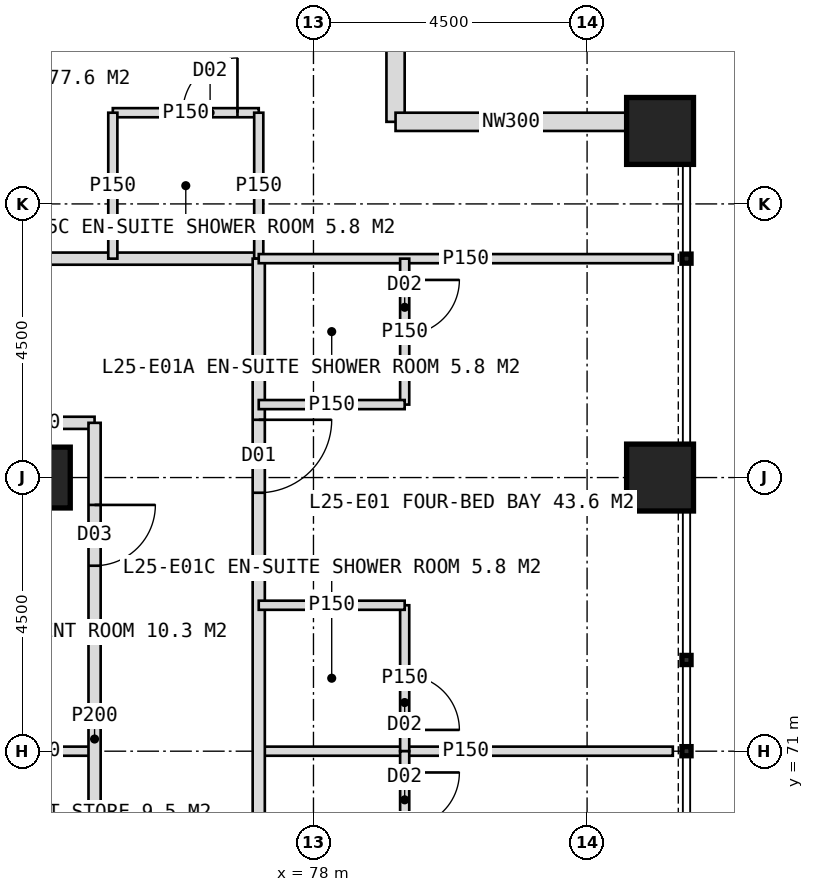
"""IFC4 building model, lengths in metres.
Left out: names, types, materials, properties, quantities, classifications, styles, units other than length and angle.
Written with IfcOpenShell. Run it as: python <this file> out.ifc"""

import sys

from ifc_helpers import new_model, si_unit, direction, frame, frame_2d, origin, origin_2d, place, context, subcontext, project, spatial, rectangle, hollow_rectangle, extrude, element, fill, save


model = new_model("IFC4")
c1 = context("Model", 3, precision=1e-05, world=origin(), true_north=direction((0.0, 1.0)))
c2 = subcontext(c1, "Body", "Model", "MODEL_VIEW")
j1 = project(units=[si_unit("LENGTHUNIT", "METRE"), si_unit("PLANEANGLEUNIT", "RADIAN")], contexts=[c1])
p1 = place(None, origin())
s1 = spatial("IfcSite", under=j1, at=p1, CompositionType="ELEMENT")
p2 = place(p1, origin())
s2 = spatial("IfcBuilding", under=s1, at=p2, CompositionType="ELEMENT")
p3 = place(p2, frame((0.0, 0.0, 108.0)))
s3 = spatial("IfcBuildingStorey", under=s2, at=p3, CompositionType="ELEMENT", Elevation=108.0)
p4 = place(p3, frame((73.5, 75.5, 0.0), z_axis=(0.0, 0.0, 1.0), x_axis=(1.0, 0.0, 0.0)))
e1 = element("IfcColumn", 1, at=p4, inside=s3, PredefinedType="COLUMN", context=c2, shape_type="SweptSolid", body=[
    extrude(hollow_rectangle(XDim=1.0, YDim=1.0, WallThickness=0.1, at=origin_2d()), origin(), (0.0, 0.0, 1.0), 4.0),
])
for number, where, z_axis, x_axis in (
    (2, (83.7, 75.5, 0.0), (0.0, 0.0, 1.0), (1.0, 0.0, 0.0)),
    (3, (83.7, 81.2, 0.0), (0.0, 0.0, 1.0), (1.0, 0.0, 0.0)),
):
    element("IfcColumn", number, at=place(p3, frame(where, z_axis=z_axis, x_axis=x_axis)), inside=s3, PredefinedType="COLUMN", context=c2, shape_type="SweptSolid", body=[
        extrude(hollow_rectangle(XDim=1.1, YDim=1.1, WallThickness=0.1, at=origin_2d()), origin(), (0.0, 0.0, 1.0), 4.0),
    ])
for number, where, z_axis, x_axis in (
    (4, (79.35, 85.15, 0.0), (0.0, 0.0, 1.0), (0.0, -1.0, 0.0)),
    (5, (79.35, 81.35, 0.0), (0.0, 0.0, 1.0), (1.0, 0.0, 0.0)),
):
    element("IfcWall", number, at=place(p3, frame(where, z_axis=z_axis, x_axis=x_axis)), inside=s3, PredefinedType="ELEMENTEDWALL", context=c2, shape_type="SweptSolid", body=[
        extrude(rectangle(XDim=3.8, YDim=0.3, at=frame_2d((1.9, 0.0))), origin(), (0.0, 0.0, 1.0), 4.0),
    ])
p5 = place(p3, frame((42.9, 79.1, 0.0), z_axis=(0.0, 0.0, 1.0), x_axis=(1.0, 0.0, 0.0)))
e6 = element("IfcWall", 6, at=p5, inside=s3, PredefinedType="PARTITIONING", context=c2, shape_type="SweptSolid", body=[
    extrude(rectangle(XDim=34.2, YDim=0.2, at=frame_2d((17.1, 0.0))), origin(), (0.0, 0.0, 1.0), 3.75),
])
p6 = place(p5, frame((3.25, 0.0, 0.0)))
e7 = element("IfcOpeningElement", 7, at=p6, cuts=e6, PredefinedType="OPENING", context=c2, shape_type="SweptSolid", body=[
    extrude(rectangle(XDim=1.2, YDim=2.2, at=frame_2d((0.6, 1.1))), frame((0.0, 0.11, 0.0), z_axis=(0.0, -1.0, 0.0), x_axis=(1.0, 0.0, 0.0)), (0.0, 0.0, 1.0), 0.22),
])
p7 = place(p5, frame((9.25, 0.0, 0.0)))
e8 = element("IfcOpeningElement", 8, at=p7, cuts=e6, PredefinedType="OPENING", context=c2, shape_type="SweptSolid", body=[
    extrude(rectangle(XDim=1.2, YDim=2.2, at=frame_2d((0.6, 1.1))), frame((0.0, 0.11, 0.0), z_axis=(0.0, -1.0, 0.0), x_axis=(1.0, 0.0, 0.0)), (0.0, 0.0, 1.0), 0.22),
])
p8 = place(p5, frame((13.75, 0.0, 0.0)))
e9 = element("IfcOpeningElement", 9, at=p8, cuts=e6, PredefinedType="OPENING", context=c2, shape_type="SweptSolid", body=[
    extrude(rectangle(XDim=1.2, YDim=2.2, at=frame_2d((0.6, 1.1))), frame((0.0, 0.11, 0.0), z_axis=(0.0, -1.0, 0.0), x_axis=(1.0, 0.0, 0.0)), (0.0, 0.0, 1.0), 0.22),
])
p9 = place(p5, frame((19.6, 0.0, 0.0)))
e10 = element("IfcOpeningElement", 10, at=p9, cuts=e6, PredefinedType="OPENING", context=c2, shape_type="SweptSolid", body=[
    extrude(rectangle(XDim=1.0, YDim=2.1, at=frame_2d((0.5, 1.05))), frame((0.0, 0.11, 0.0), z_axis=(0.0, -1.0, 0.0), x_axis=(1.0, 0.0, 0.0)), (0.0, 0.0, 1.0), 0.22),
])
p10 = place(p5, frame((27.25, 0.0, 0.0)))
e11 = element("IfcOpeningElement", 11, at=p10, cuts=e6, PredefinedType="OPENING", context=c2, shape_type="SweptSolid", body=[
    extrude(rectangle(XDim=1.2, YDim=2.2, at=frame_2d((0.6, 1.1))), frame((0.0, 0.11, 0.0), z_axis=(0.0, -1.0, 0.0), x_axis=(1.0, 0.0, 0.0)), (0.0, 0.0, 1.0), 0.22),
])
p11 = place(p3, frame((74.7, 81.5, 0.0), z_axis=(0.0, 0.0, 1.0), x_axis=(1.0, 0.0, 0.0)))
e12 = element("IfcWall", 12, at=p11, inside=s3, PredefinedType="PARTITIONING", context=c2, shape_type="SweptSolid", body=[
    extrude(rectangle(XDim=2.4, YDim=0.15, at=frame_2d((1.2, 0.0))), origin(), (0.0, 0.0, 1.0), 3.75),
])
p12 = place(p11, frame((1.15, 0.0, 0.0)))
e13 = element("IfcOpeningElement", 13, at=p12, cuts=e12, PredefinedType="OPENING", context=c2, shape_type="SweptSolid", body=[
    extrude(rectangle(XDim=0.9, YDim=2.1, at=frame_2d((0.45, 1.05))), frame((0.0, 0.085, 0.0), z_axis=(0.0, -1.0, 0.0), x_axis=(1.0, 0.0, 0.0)), (0.0, 0.0, 1.0), 0.17),
])
for number, where, z_axis, x_axis in (
    (14, (74.7, 79.1, 0.0), (0.0, 0.0, 1.0), (0.0, 1.0, 0.0)),
    (15, (77.1, 79.1, 0.0), (0.0, 0.0, 1.0), (0.0, 1.0, 0.0)),
):
    element("IfcWall", number, at=place(p3, frame(where, z_axis=z_axis, x_axis=x_axis)), inside=s3, PredefinedType="PARTITIONING", context=c2, shape_type="SweptSolid", body=[
        extrude(rectangle(XDim=2.4, YDim=0.15, at=frame_2d((1.2, 0.0))), origin(), (0.0, 0.0, 1.0), 3.75),
    ])
p13 = place(p3, frame((72.5, 76.4, 0.0), z_axis=(0.0, 0.0, 1.0), x_axis=(1.0, 0.0, 0.0)))
e16 = element("IfcWall", 16, at=p13, inside=s3, PredefinedType="PARTITIONING", context=c2, shape_type="SweptSolid", body=[
    extrude(rectangle(XDim=1.9, YDim=0.2, at=frame_2d((0.95, 0.0))), origin(), (0.0, 0.0, 1.0), 3.75),
])
p14 = place(p3, frame((77.1, 71.0, 0.0), z_axis=(0.0, 0.0, 1.0), x_axis=(1.0, 0.0, 0.0)))
e17 = element("IfcWall", 17, at=p14, inside=s3, PredefinedType="PARTITIONING", context=c2, shape_type="SweptSolid", body=[
    extrude(rectangle(XDim=6.81, YDim=0.15, at=frame_2d((3.405, 0.0))), origin(), (0.0, 0.0, 1.0), 3.75),
])
p15 = place(p3, frame((77.1, 79.1, 0.0), z_axis=(0.0, 0.0, 1.0), x_axis=(0.0, -1.0, 0.0)))
e18 = element("IfcWall", 18, at=p15, inside=s3, PredefinedType="PARTITIONING", context=c2, shape_type="SweptSolid", body=[
    extrude(rectangle(XDim=34.2, YDim=0.2, at=frame_2d((17.1, 0.0))), origin(), (0.0, 0.0, 1.0), 3.75),
])
p16 = place(p15, frame((2.65, 0.0, 0.0)))
e19 = element("IfcOpeningElement", 19, at=p16, cuts=e18, PredefinedType="OPENING", context=c2, shape_type="SweptSolid", body=[
    extrude(rectangle(XDim=1.2, YDim=2.2, at=frame_2d((0.6, 1.1))), frame((0.0, 0.11, 0.0), z_axis=(0.0, -1.0, 0.0), x_axis=(1.0, 0.0, 0.0)), (0.0, 0.0, 1.0), 0.22),
])
p17 = place(p15, frame((10.75, 0.0, 0.0)))
e20 = element("IfcOpeningElement", 20, at=p17, cuts=e18, PredefinedType="OPENING", context=c2, shape_type="SweptSolid", body=[
    extrude(rectangle(XDim=1.2, YDim=2.2, at=frame_2d((0.6, 1.1))), frame((0.0, 0.11, 0.0), z_axis=(0.0, -1.0, 0.0), x_axis=(1.0, 0.0, 0.0)), (0.0, 0.0, 1.0), 0.22),
])
p18 = place(p15, frame((19.75, 0.0, 0.0)))
e21 = element("IfcOpeningElement", 21, at=p18, cuts=e18, PredefinedType="OPENING", context=c2, shape_type="SweptSolid", body=[
    extrude(rectangle(XDim=1.2, YDim=2.2, at=frame_2d((0.6, 1.1))), frame((0.0, 0.11, 0.0), z_axis=(0.0, -1.0, 0.0), x_axis=(1.0, 0.0, 0.0)), (0.0, 0.0, 1.0), 0.22),
])
p19 = place(p15, frame((25.75, 0.0, 0.0)))
e22 = element("IfcOpeningElement", 22, at=p19, cuts=e18, PredefinedType="OPENING", context=c2, shape_type="SweptSolid", body=[
    extrude(rectangle(XDim=1.2, YDim=2.2, at=frame_2d((0.6, 1.1))), frame((0.0, 0.11, 0.0), z_axis=(0.0, -1.0, 0.0), x_axis=(1.0, 0.0, 0.0)), (0.0, 0.0, 1.0), 0.22),
])
p20 = place(p15, frame((30.25, 0.0, 0.0)))
e23 = element("IfcOpeningElement", 23, at=p20, cuts=e18, PredefinedType="OPENING", context=c2, shape_type="SweptSolid", body=[
    extrude(rectangle(XDim=1.2, YDim=2.2, at=frame_2d((0.6, 1.1))), frame((0.0, 0.11, 0.0), z_axis=(0.0, -1.0, 0.0), x_axis=(1.0, 0.0, 0.0)), (0.0, 0.0, 1.0), 0.22),
])
p21 = place(p3, frame((77.1, 79.1, 0.0), z_axis=(0.0, 0.0, 1.0), x_axis=(1.0, 0.0, 0.0)))
e24 = element("IfcWall", 24, at=p21, inside=s3, PredefinedType="PARTITIONING", context=c2, shape_type="SweptSolid", body=[
    extrude(rectangle(XDim=6.81, YDim=0.15, at=frame_2d((3.405, 0.0))), origin(), (0.0, 0.0, 1.0), 3.75),
])
p22 = place(p3, frame((79.5, 79.1, 0.0), z_axis=(0.0, 0.0, 1.0), x_axis=(0.0, -1.0, 0.0)))
e25 = element("IfcWall", 25, at=p22, inside=s3, PredefinedType="PARTITIONING", context=c2, shape_type="SweptSolid", body=[
    extrude(rectangle(XDim=2.4, YDim=0.15, at=frame_2d((1.2, 0.0))), origin(), (0.0, 0.0, 1.0), 3.75),
])
p23 = place(p22, frame((0.35, 0.0, 0.0)))
e26 = element("IfcOpeningElement", 26, at=p23, cuts=e25, PredefinedType="OPENING", context=c2, shape_type="SweptSolid", body=[
    extrude(rectangle(XDim=0.9, YDim=2.1, at=frame_2d((0.45, 1.05))), frame((0.0, 0.085, 0.0), z_axis=(0.0, -1.0, 0.0), x_axis=(1.0, 0.0, 0.0)), (0.0, 0.0, 1.0), 0.17),
])
p24 = place(p3, frame((77.1, 76.7, 0.0), z_axis=(0.0, 0.0, 1.0), x_axis=(1.0, 0.0, 0.0)))
e27 = element("IfcWall", 27, at=p24, inside=s3, PredefinedType="PARTITIONING", context=c2, shape_type="SweptSolid", body=[
    extrude(rectangle(XDim=2.4, YDim=0.15, at=frame_2d((1.2, 0.0))), origin(), (0.0, 0.0, 1.0), 3.75),
])
p25 = place(p3, frame((79.5, 73.4, 0.0), z_axis=(0.0, 0.0, 1.0), x_axis=(0.0, -1.0, 0.0)))
e28 = element("IfcWall", 28, at=p25, inside=s3, PredefinedType="PARTITIONING", context=c2, shape_type="SweptSolid", body=[
    extrude(rectangle(XDim=2.4, YDim=0.15, at=frame_2d((1.2, 0.0))), origin(), (0.0, 0.0, 1.0), 3.75),
])
p26 = place(p25, frame((1.15, 0.0, 0.0)))
e29 = element("IfcOpeningElement", 29, at=p26, cuts=e28, PredefinedType="OPENING", context=c2, shape_type="SweptSolid", body=[
    extrude(rectangle(XDim=0.9, YDim=2.1, at=frame_2d((0.45, 1.05))), frame((0.0, 0.085, 0.0), z_axis=(0.0, -1.0, 0.0), x_axis=(1.0, 0.0, 0.0)), (0.0, 0.0, 1.0), 0.17),
])
p27 = place(p3, frame((77.1, 73.4, 0.0), z_axis=(0.0, 0.0, 1.0), x_axis=(1.0, 0.0, 0.0)))
e30 = element("IfcWall", 30, at=p27, inside=s3, PredefinedType="PARTITIONING", context=c2, shape_type="SweptSolid", body=[
    extrude(rectangle(XDim=2.4, YDim=0.15, at=frame_2d((1.2, 0.0))), origin(), (0.0, 0.0, 1.0), 3.75),
])
p28 = place(p3, frame((79.5, 71.0, 0.0), z_axis=(0.0, 0.0, 1.0), x_axis=(0.0, -1.0, 0.0)))
e31 = element("IfcWall", 31, at=p28, inside=s3, PredefinedType="PARTITIONING", context=c2, shape_type="SweptSolid", body=[
    extrude(rectangle(XDim=2.4, YDim=0.15, at=frame_2d((1.2, 0.0))), origin(), (0.0, 0.0, 1.0), 3.75),
])
p29 = place(p28, frame((0.35, 0.0, 0.0)))
e32 = element("IfcOpeningElement", 32, at=p29, cuts=e31, PredefinedType="OPENING", context=c2, shape_type="SweptSolid", body=[
    extrude(rectangle(XDim=0.9, YDim=2.1, at=frame_2d((0.45, 1.05))), frame((0.0, 0.085, 0.0), z_axis=(0.0, -1.0, 0.0), x_axis=(1.0, 0.0, 0.0)), (0.0, 0.0, 1.0), 0.17),
])
p30 = place(p3, frame((72.5, 71.0, 0.0), z_axis=(0.0, 0.0, 1.0), x_axis=(1.0, 0.0, 0.0)))
e33 = element("IfcWall", 33, at=p30, inside=s3, PredefinedType="PARTITIONING", context=c2, shape_type="SweptSolid", body=[
    extrude(rectangle(XDim=1.9, YDim=0.15, at=frame_2d((0.95, 0.0))), origin(), (0.0, 0.0, 1.0), 3.75),
])
p31 = place(p3, frame((74.4, 76.4, 0.0), z_axis=(0.0, 0.0, 1.0), x_axis=(0.0, -1.0, 0.0)))
e34 = element("IfcWall", 34, at=p31, inside=s3, PredefinedType="PARTITIONING", context=c2, shape_type="SweptSolid", body=[
    extrude(rectangle(XDim=10.4, YDim=0.2, at=frame_2d((5.2, 0.0))), origin(), (0.0, 0.0, 1.0), 3.75),
])
p32 = place(p31, frame((1.35, 0.0, 0.0)))
e35 = element("IfcOpeningElement", 35, at=p32, cuts=e34, PredefinedType="OPENING", context=c2, shape_type="SweptSolid", body=[
    extrude(rectangle(XDim=1.0, YDim=2.1, at=frame_2d((0.5, 1.05))), frame((0.0, 0.11, 0.0), z_axis=(0.0, -1.0, 0.0), x_axis=(1.0, 0.0, 0.0)), (0.0, 0.0, 1.0), 0.22),
])
p33 = place(p31, frame((7.4, 0.0, 0.0)))
e36 = element("IfcOpeningElement", 36, at=p33, cuts=e34, PredefinedType="OPENING", context=c2, shape_type="SweptSolid", body=[
    extrude(rectangle(XDim=1.0, YDim=2.1, at=frame_2d((0.5, 1.05))), frame((0.0, 0.11, 0.0), z_axis=(0.0, -1.0, 0.0), x_axis=(1.0, 0.0, 0.0)), (0.0, 0.0, 1.0), 0.22),
])
p34 = place(p12, origin())
e37 = element("IfcDoor", 37, at=p34, inside=s3, OperationType="SINGLE_SWING_RIGHT", PredefinedType="DOOR", context=c2, shape_type="SweptSolid", body=[
    extrude(rectangle(XDim=0.9, YDim=2.1, at=frame_2d((0.45, 1.05))), frame((0.0, 0.025, 0.0), z_axis=(0.0, -1.0, 0.0), x_axis=(1.0, 0.0, 0.0)), (0.0, 0.0, 1.0), 0.05),
])
fill(e13, e37)
p35 = place(p32, origin())
e38 = element("IfcDoor", 38, at=p35, inside=s3, OperationType="SINGLE_SWING_LEFT", PredefinedType="DOOR", context=c2, shape_type="SweptSolid", body=[
    extrude(rectangle(XDim=1.0, YDim=2.1, at=frame_2d((0.5, 1.05))), frame((0.0, 0.025, 0.0), z_axis=(0.0, -1.0, 0.0), x_axis=(1.0, 0.0, 0.0)), (0.0, 0.0, 1.0), 0.05),
])
fill(e35, e38)
p36 = place(p16, origin())
e39 = element("IfcDoor", 39, at=p36, inside=s3, OperationType="SINGLE_SWING_LEFT", PredefinedType="DOOR", context=c2, shape_type="SweptSolid", body=[
    extrude(rectangle(XDim=1.2, YDim=2.2, at=frame_2d((0.6, 1.1))), frame((0.0, 0.025, 0.0), z_axis=(0.0, -1.0, 0.0), x_axis=(1.0, 0.0, 0.0)), (0.0, 0.0, 1.0), 0.05),
])
fill(e19, e39)
p37 = place(p23, origin())
e40 = element("IfcDoor", 40, at=p37, inside=s3, OperationType="SINGLE_SWING_LEFT", PredefinedType="DOOR", context=c2, shape_type="SweptSolid", body=[
    extrude(rectangle(XDim=0.9, YDim=2.1, at=frame_2d((0.45, 1.05))), frame((0.0, 0.025, 0.0), z_axis=(0.0, -1.0, 0.0), x_axis=(1.0, 0.0, 0.0)), (0.0, 0.0, 1.0), 0.05),
])
fill(e26, e40)
p38 = place(p26, origin())
e41 = element("IfcDoor", 41, at=p38, inside=s3, OperationType="SINGLE_SWING_RIGHT", PredefinedType="DOOR", context=c2, shape_type="SweptSolid", body=[
    extrude(rectangle(XDim=0.9, YDim=2.1, at=frame_2d((0.45, 1.05))), frame((0.0, 0.025, 0.0), z_axis=(0.0, -1.0, 0.0), x_axis=(1.0, 0.0, 0.0)), (0.0, 0.0, 1.0), 0.05),
])
fill(e29, e41)
p39 = place(p29, origin())
e42 = element("IfcDoor", 42, at=p39, inside=s3, OperationType="SINGLE_SWING_LEFT", PredefinedType="DOOR", context=c2, shape_type="SweptSolid", body=[
    extrude(rectangle(XDim=0.9, YDim=2.1, at=frame_2d((0.45, 1.05))), frame((0.0, 0.025, 0.0), z_axis=(0.0, -1.0, 0.0), x_axis=(1.0, 0.0, 0.0)), (0.0, 0.0, 1.0), 0.05),
])
fill(e32, e42)
save(model, sys.argv[1])
